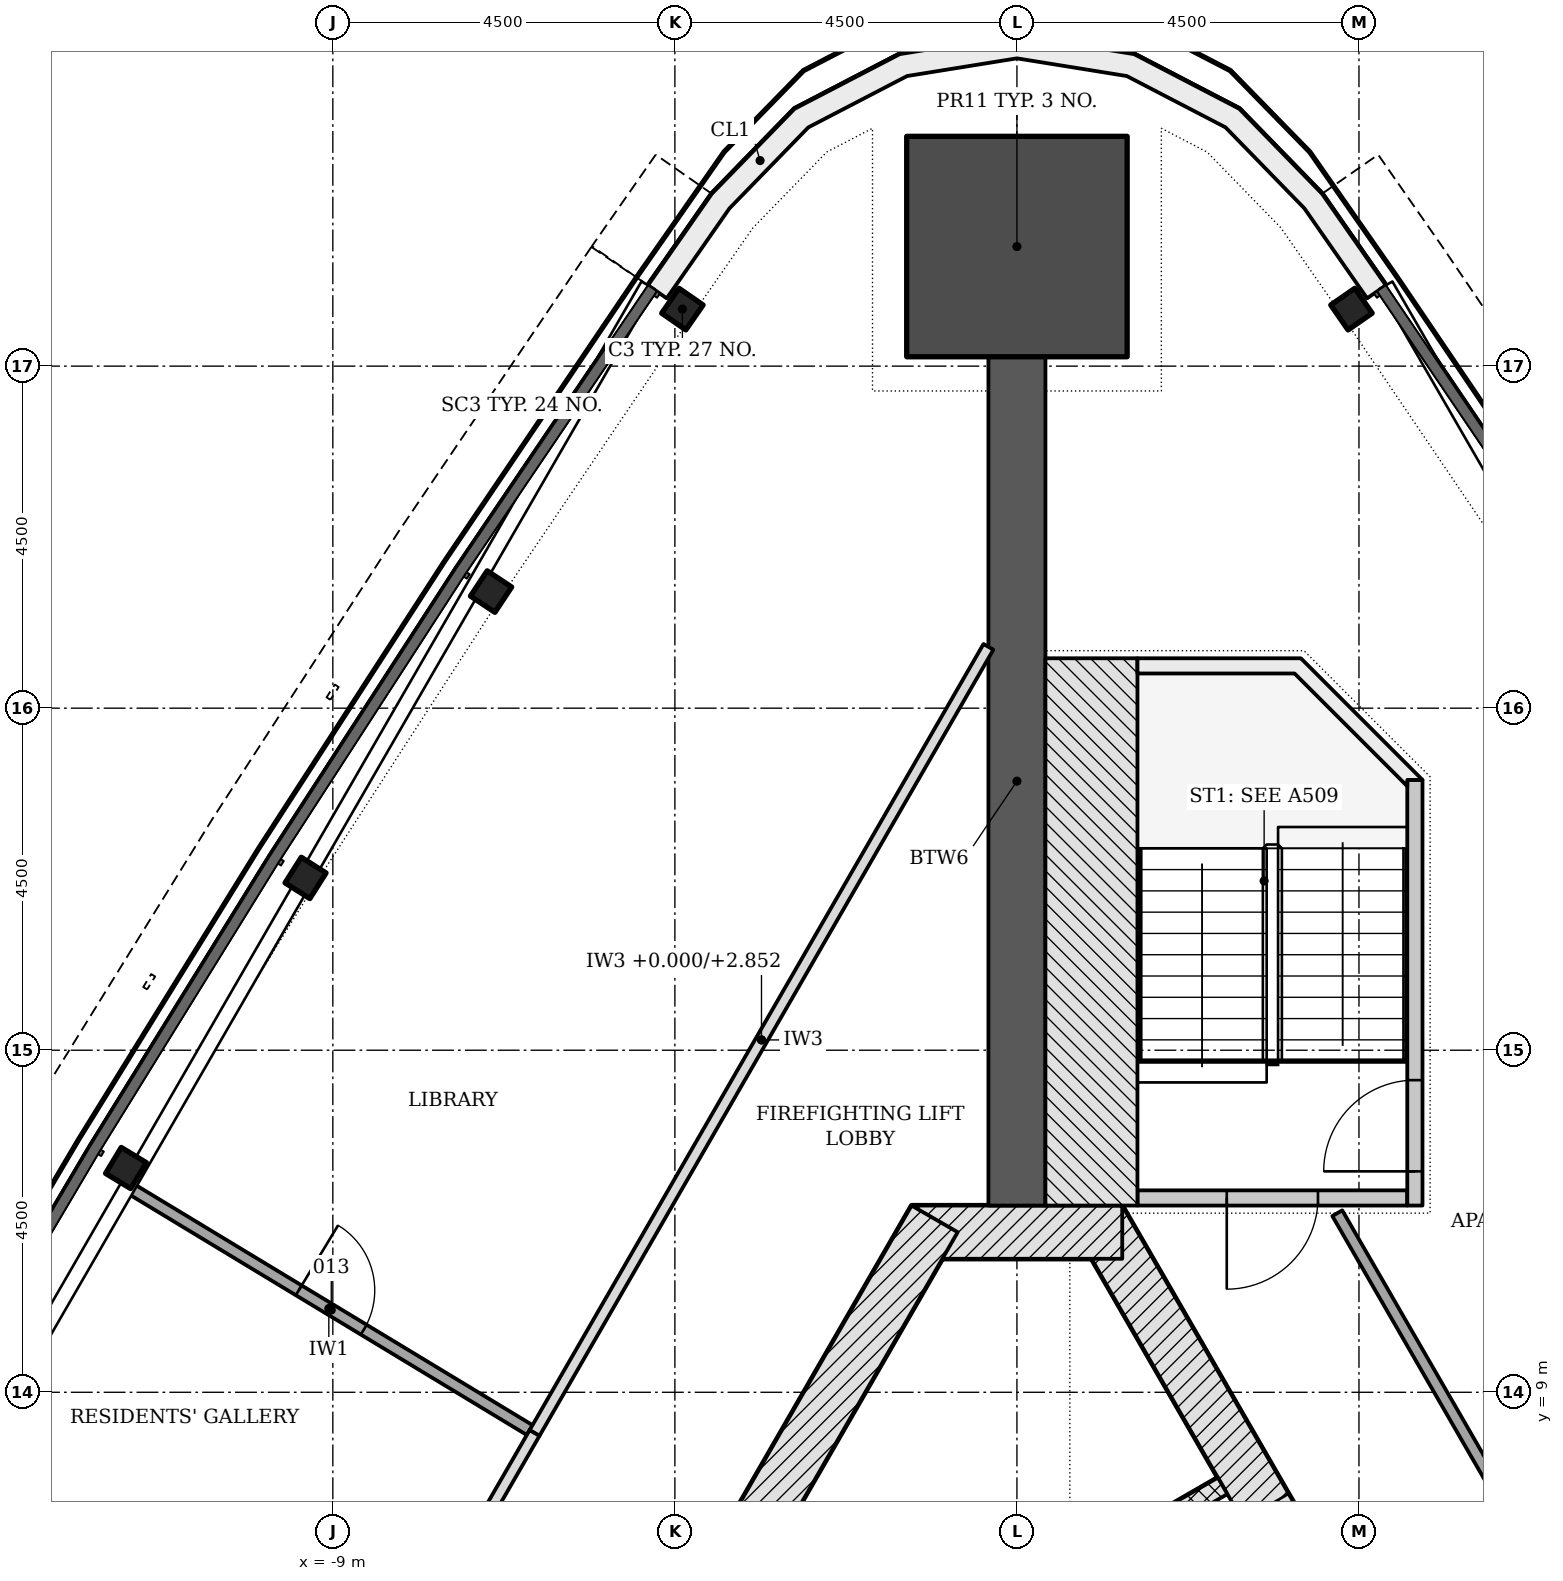
"""IFC4 building model, lengths in metres.
Left out: names, types, materials, properties, quantities, classifications, styles, units other than length and angle.
Written with IfcOpenShell. Run it as: python <this file> out.ifc"""

import sys

from ifc_helpers import new_model, si_unit, direction, frame, frame_2d, origin, origin_2d, place, context, subcontext, project, spatial, polyline, rectangle, i_section, outline, extrude, element, fill, save


model = new_model("IFC4")
c1 = context("Model", 3, precision=1e-05, world=origin(), true_north=direction((0.0, 1.0)))
c2 = subcontext(c1, "Body", "Model", "MODEL_VIEW")
j1 = project(units=[si_unit("LENGTHUNIT", "METRE"), si_unit("PLANEANGLEUNIT", "RADIAN")], contexts=[c1])
p1 = place(None, origin())
s1 = spatial("IfcSite", under=j1, at=p1, CompositionType="ELEMENT")
p2 = place(p1, origin())
s2 = spatial("IfcBuilding", under=s1, at=p2, CompositionType="ELEMENT")
p3 = place(p2, frame((0.0, 0.0, 140.1)))
s3 = spatial("IfcBuildingStorey", under=s2, at=p3, CompositionType="ELEMENT", Elevation=140.1)
p4 = place(p3, frame((10.311, -4.703, -0.2), z_axis=(0.0, 0.0, 1.0), x_axis=(-0.500001446645, 0.866024568562, 0.0)))
e1 = element("IfcWall", 1, at=p4, inside=s3, PredefinedType="SHEAR", context=c2, shape_type="SweptSolid", body=[
    extrude(rectangle(XDim=18.458, YDim=0.7, at=frame_2d((9.229, 0.0))), origin(), (0.0, 0.0, 1.0), 3.6),
])
p5 = place(p4, frame((4.379, 0.0, 0.2)))
e2 = element("IfcOpeningElement", 2, at=p5, cuts=e1, PredefinedType="OPENING", context=c2, shape_type="SweptSolid", body=[
    extrude(rectangle(XDim=1.1, YDim=2.1, at=frame_2d((0.55, 1.05))), frame((0.0, 0.36, 0.0), z_axis=(0.0, -1.0, 0.0), x_axis=(1.0, 0.0, 0.0)), (0.0, 0.0, 1.0), 0.72),
])
p6 = place(p4, frame((6.529, 0.0, 0.2)))
e3 = element("IfcOpeningElement", 3, at=p6, cuts=e1, PredefinedType="OPENING", context=c2, shape_type="SweptSolid", body=[
    extrude(rectangle(XDim=1.1, YDim=2.1, at=frame_2d((0.55, 1.05))), frame((0.0, 0.36, 0.0), z_axis=(0.0, -1.0, 0.0), x_axis=(1.0, 0.0, 0.0)), (0.0, 0.0, 1.0), 0.72),
])
p7 = place(p4, frame((8.679, 0.0, 0.2)))
e4 = element("IfcOpeningElement", 4, at=p7, cuts=e1, PredefinedType="OPENING", context=c2, shape_type="SweptSolid", body=[
    extrude(rectangle(XDim=1.1, YDim=2.1, at=frame_2d((0.55, 1.05))), frame((0.0, 0.36, 0.0), z_axis=(0.0, -1.0, 0.0), x_axis=(1.0, 0.0, 0.0)), (0.0, 0.0, 1.0), 0.72),
])
p8 = place(p4, frame((10.829, 0.0, 0.2)))
e5 = element("IfcOpeningElement", 5, at=p8, cuts=e1, PredefinedType="OPENING", context=c2, shape_type="SweptSolid", body=[
    extrude(rectangle(XDim=1.1, YDim=2.1, at=frame_2d((0.55, 1.05))), frame((0.0, 0.36, 0.0), z_axis=(0.0, -1.0, 0.0), x_axis=(1.0, 0.0, 0.0)), (0.0, 0.0, 1.0), 0.72),
])
p9 = place(p4, frame((12.979, 0.0, 0.2)))
e6 = element("IfcOpeningElement", 6, at=p9, cuts=e1, PredefinedType="OPENING", context=c2, shape_type="SweptSolid", body=[
    extrude(rectangle(XDim=1.1, YDim=2.1, at=frame_2d((0.55, 1.05))), frame((0.0, 0.36, 0.0), z_axis=(0.0, -1.0, 0.0), x_axis=(1.0, 0.0, 0.0)), (0.0, 0.0, 1.0), 0.72),
])
p10 = place(p3, frame((1.386, 11.106, -0.2), z_axis=(0.0, 0.0, 1.0), x_axis=(-1.0, 0.0, 0.0)))
e7 = element("IfcWall", 7, at=p10, inside=s3, PredefinedType="SHEAR", context=c2, shape_type="SweptSolid", body=[
    extrude(rectangle(XDim=2.771, YDim=0.7, at=frame_2d((1.386, 0.0))), origin(), (0.0, 0.0, 1.0), 3.6),
])
p11 = place(p3, frame((-1.083, 11.281, -0.2), z_axis=(0.0, 0.0, 1.0), x_axis=(-0.500001446645, -0.866024568562, 0.0)))
e8 = element("IfcWall", 8, at=p11, inside=s3, PredefinedType="SHEAR", context=c2, shape_type="SweptSolid", body=[
    extrude(rectangle(XDim=18.458, YDim=0.7, at=frame_2d((9.229, 0.0))), origin(), (0.0, 0.0, 1.0), 3.6),
])
p12 = place(p11, frame((8.979, 0.0, 0.2)))
e9 = element("IfcOpeningElement", 9, at=p12, cuts=e8, PredefinedType="OPENING", context=c2, shape_type="SweptSolid", body=[
    extrude(rectangle(XDim=1.2, YDim=2.1, at=frame_2d((0.6, 1.05))), frame((0.0, 0.36, 0.0), z_axis=(0.0, -1.0, 0.0), x_axis=(1.0, 0.0, 0.0)), (0.0, 0.0, 1.0), 0.72),
])
p13 = place(p11, frame((11.029, 0.0, 0.2)))
e10 = element("IfcOpeningElement", 10, at=p13, cuts=e8, PredefinedType="OPENING", context=c2, shape_type="SweptSolid", body=[
    extrude(rectangle(XDim=1.2, YDim=2.1, at=frame_2d((0.6, 1.05))), frame((0.0, 0.36, 0.0), z_axis=(0.0, -1.0, 0.0), x_axis=(1.0, 0.0, 0.0)), (0.0, 0.0, 1.0), 0.72),
])
p14 = place(p3, frame((0.0, 11.456, -0.2), z_axis=(0.0, 0.0, 1.0), x_axis=(0.0, 1.0, 0.0)))
e11 = element("IfcWall", 11, at=p14, inside=s3, PredefinedType="SHEAR", context=c2, shape_type="SweptSolid", body=[
    extrude(rectangle(XDim=11.167, YDim=0.75, at=frame_2d((5.583, 0.0))), origin(), (0.0, 0.0, 1.0), 3.6),
])
p15 = place(p3, frame((0.0, 24.073, -0.2), z_axis=(0.0, 0.0, 1.0), x_axis=(0.0, 1.0, 0.0)))
e12 = element("IfcColumn", 12, at=p15, inside=s3, PredefinedType="COLUMN", context=c2, shape_type="SweptSolid", body=[
    extrude(rectangle(XDim=2.9, YDim=2.9, at=origin_2d()), origin(), (0.0, 0.0, 1.0), 3.6),
])
for number, where, z_axis, x_axis in (
    (13, (-4.401, 23.25, -0.2), (0.0, 0.0, 1.0), (-0.569, -0.822, 0.0)),
    (14, (-6.918, 19.534, -0.2), (0.0, 0.0, 1.0), (-0.552, -0.834, 0.0)),
    (15, (-9.359, 15.767, -0.2), (0.0, 0.0, 1.0), (-0.535, -0.845, 0.0)),
    (16, (-11.722, 11.95, -0.2), (0.0, 0.0, 1.0), (-0.518, -0.856, 0.0)),
    (17, (4.401, 23.25, -0.2), (0.0, 0.0, 1.0), (-0.569, 0.822, 0.0)),
):
    element("IfcColumn", number, at=place(p3, frame(where, z_axis=z_axis, x_axis=x_axis)), inside=s3, PredefinedType="COLUMN", context=c2, shape_type="SweptSolid", body=[
        extrude(i_section(OverallWidth=0.399, OverallDepth=0.386, WebThickness=0.021, FlangeThickness=0.033, FilletRadius=0.015, at=origin_2d()), origin(), (0.0, 0.0, 1.0), 3.6),
    ])
p16 = place(p3, origin())
e18 = element("IfcWall", 18, at=p16, inside=s3, PredefinedType="NOTDEFINED", context=c2, shape_type="SweptSolid", body=[
    extrude(outline(polyline([(4.853, 23.563), (4.014, 24.767), (2.925, 25.885), (1.541, 26.605), (0.0, 26.853), (-1.541, 26.605), (-2.925, 25.885), (-4.014, 24.767), (-4.853, 23.563), (-4.607, 23.392), (-3.782, 24.575), (-2.744, 25.641), (-1.445, 26.316), (0.0, 26.549), (1.445, 26.316), (2.744, 25.641), (3.782, 24.575), (4.607, 23.392), (4.853, 23.563)])), origin(), (0.0, 0.0, 1.0), 3.3),
])
p17 = place(p3, frame((2.706, 7.769, -0.2), z_axis=(0.0, 0.0, 1.0), x_axis=(-0.866022959057, -0.500004234368, 0.0)))
e19 = element("IfcWall", 19, at=p17, inside=s3, PredefinedType="PARTITIONING", context=c2, shape_type="SweptSolid", body=[
    extrude(rectangle(XDim=2.5, YDim=0.25, at=frame_2d((1.25, 0.0))), origin(), (0.0, 0.0, 1.0), 3.6),
])
p18 = place(p3, frame((5.135, 11.556, -0.2), z_axis=(0.0, 0.0, 1.0), x_axis=(-1.0, 0.0, 0.0)))
e20 = element("IfcWall", 20, at=p18, inside=s3, PredefinedType="SHEAR", context=c2, shape_type="SweptSolid", body=[
    extrude(rectangle(XDim=3.55, YDim=0.2, at=frame_2d((1.775, 0.0))), origin(), (0.0, 0.0, 1.0), 3.6),
])
p19 = place(p18, frame((1.175, 0.0, 0.2)))
e21 = element("IfcOpeningElement", 21, at=p19, cuts=e20, PredefinedType="OPENING", context=c2, shape_type="SweptSolid", body=[
    extrude(rectangle(XDim=1.2, YDim=2.1, at=frame_2d((0.6, 1.05))), frame((0.0, 0.11, 0.0), z_axis=(0.0, -1.0, 0.0), x_axis=(1.0, 0.0, 0.0)), (0.0, 0.0, 1.0), 0.22),
])
p20 = place(p3, frame((5.236, 11.456, -0.2), z_axis=(0.0, 0.0, 1.0), x_axis=(0.0, 1.0, 0.0)))
e22 = element("IfcWall", 22, at=p20, inside=s3, PredefinedType="SHEAR", context=c2, shape_type="SweptSolid", body=[
    extrude(rectangle(XDim=5.6, YDim=0.2, at=frame_2d((2.8, 0.0))), origin(), (0.0, 0.0, 1.0), 3.6),
])
p21 = place(p20, frame((0.45, 0.0, 0.2)))
e23 = element("IfcOpeningElement", 23, at=p21, cuts=e22, PredefinedType="OPENING", context=c2, shape_type="SweptSolid", body=[
    extrude(rectangle(XDim=1.2, YDim=2.1, at=frame_2d((0.6, 1.05))), frame((0.0, 0.11, 0.0), z_axis=(0.0, -1.0, 0.0), x_axis=(1.0, 0.0, 0.0)), (0.0, 0.0, 1.0), 0.22),
])
p22 = place(p3, frame((0.98, 11.456, -0.2), z_axis=(0.0, 0.0, 1.0), x_axis=(0.0, 1.0, 0.0)))
e24 = element("IfcWall", 24, at=p22, inside=s3, PredefinedType="SHEAR", context=c2, shape_type="SweptSolid", body=[
    extrude(rectangle(XDim=7.2, YDim=1.211, at=frame_2d((3.6, 0.0))), origin(), (0.0, 0.0, 1.0), 3.6),
])
p23 = place(p3, frame((0.0, 0.0, -0.2)))
e25 = element("IfcWall", 25, at=p23, inside=s3, PredefinedType="SHEAR", context=c2, shape_type="SweptSolid", body=[
    extrude(outline(polyline([(5.336, 17.056), (3.736, 18.656), (1.586, 18.656), (1.586, 18.456), (3.653, 18.456), (5.135, 16.974), (5.135, 17.056), (5.135, 17.056), (5.135, 17.056), (5.135, 17.056), (5.135, 17.056), (5.135, 17.056), (5.135, 17.056), (5.135, 17.056), (5.135, 17.056), (5.135, 17.056), (5.135, 17.056), (5.135, 17.056), (5.135, 17.056), (5.135, 17.056), (5.135, 17.056), (5.135, 17.056), (5.135, 17.056), (5.336, 17.056)])), origin(), (0.0, 0.0, 1.0), 3.6),
])
p24 = place(p3, frame((7.979, 4.837, 0.0), z_axis=(0.0, 0.0, 1.0), x_axis=(-0.500014427086, 0.866017074142, 0.0)))
e26 = element("IfcWall", 26, at=p24, inside=s3, PredefinedType="PARTITIONING", context=c2, shape_type="SweptSolid", body=[
    extrude(rectangle(XDim=7.528, YDim=0.15, at=frame_2d((3.764, 0.0))), origin(), (0.0, 0.0, 1.0), 2.847),
])
p25 = place(p3, frame((-0.375, 18.807, 0.0), z_axis=(0.0, 0.0, 1.0), x_axis=(-0.499995562011, -0.866027966043, 0.0)))
e27 = element("IfcWall", 27, at=p25, inside=s3, PredefinedType="PARTITIONING", context=c2, shape_type="SweptSolid", body=[
    extrude(rectangle(XDim=11.942, YDim=0.15, at=frame_2d((5.971, 0.0))), origin(), (0.0, 0.0, 1.0), 2.852),
])
p26 = place(p3, frame((-11.695, 11.7, 0.0), z_axis=(0.0, 0.0, 1.0), x_axis=(0.855596827578, -0.517642800238, 0.0)))
e28 = element("IfcWall", 28, at=p26, inside=s3, PredefinedType="PARTITIONING", context=c2, shape_type="SweptSolid", body=[
    extrude(rectangle(XDim=6.177, YDim=0.15, at=frame_2d((3.088, 0.0))), origin(), (0.0, 0.0, 1.0), 3.4),
])
p27 = place(p26, frame((2.626, 0.0, 0.0)))
e29 = element("IfcOpeningElement", 29, at=p27, cuts=e28, PredefinedType="OPENING", context=c2, shape_type="SweptSolid", body=[
    extrude(rectangle(XDim=1.0, YDim=2.1, at=frame_2d((0.5, 1.05))), frame((0.0, 0.085, 0.0), z_axis=(0.0, -1.0, 0.0), x_axis=(1.0, 0.0, 0.0)), (0.0, 0.0, 1.0), 0.17),
])
p28 = place(p3, frame((-13.974, 7.837, 0.0), z_axis=(0.0, 0.0, 1.0), x_axis=(0.866040415161, -0.499973998632, 0.0)))
e30 = element("IfcWall", 30, at=p28, inside=s3, PredefinedType="PARTITIONING", context=c2, shape_type="SweptSolid", body=[
    extrude(rectangle(XDim=6.217, YDim=0.15, at=frame_2d((3.108, 0.0))), origin(), (0.0, 0.0, 1.0), 3.4),
])
p29 = place(p28, frame((2.646, 0.0, 0.0)))
e31 = element("IfcOpeningElement", 31, at=p29, cuts=e30, PredefinedType="OPENING", context=c2, shape_type="SweptSolid", body=[
    extrude(rectangle(XDim=1.0, YDim=2.1, at=frame_2d((0.5, 1.05))), frame((0.0, 0.085, 0.0), z_axis=(0.0, -1.0, 0.0), x_axis=(1.0, 0.0, 0.0)), (0.0, 0.0, 1.0), 0.17),
])
p30 = place(p3, frame((-6.346, 8.464, 0.0), z_axis=(0.0, 0.0, 1.0), x_axis=(-0.50001992892, -0.866013897511, 0.0)))
e32 = element("IfcWall", 32, at=p30, inside=s3, PredefinedType="PARTITIONING", context=c2, shape_type="SweptSolid", body=[
    extrude(rectangle(XDim=4.357, YDim=0.15, at=frame_2d((2.179, 0.0))), origin(), (0.0, 0.0, 1.0), 2.847),
])
p31 = place(p30, frame((1.678, 0.0, 0.0)))
e33 = element("IfcOpeningElement", 33, at=p31, cuts=e32, PredefinedType="OPENING", context=c2, shape_type="SweptSolid", body=[
    extrude(rectangle(XDim=1.0, YDim=2.1, at=frame_2d((0.5, 1.05))), frame((0.0, 0.085, 0.0), z_axis=(0.0, -1.0, 0.0), x_axis=(1.0, 0.0, 0.0)), (0.0, 0.0, 1.0), 0.17),
])
p32 = place(p19, origin())
e34 = element("IfcDoor", 34, at=p32, inside=s3, OperationType="SINGLE_SWING_RIGHT", PredefinedType="DOOR", context=c2, shape_type="SweptSolid", body=[
    extrude(rectangle(XDim=1.2, YDim=2.1, at=frame_2d((0.6, 1.05))), frame((0.0, 0.025, 0.0), z_axis=(0.0, -1.0, 0.0), x_axis=(1.0, 0.0, 0.0)), (0.0, 0.0, 1.0), 0.05),
])
fill(e21, e34)
p33 = place(p21, origin())
e35 = element("IfcDoor", 35, at=p33, inside=s3, OperationType="SINGLE_SWING_LEFT", PredefinedType="DOOR", context=c2, shape_type="SweptSolid", body=[
    extrude(rectangle(XDim=1.2, YDim=2.1, at=frame_2d((0.6, 1.05))), frame((0.0, 0.025, 0.0), z_axis=(0.0, -1.0, 0.0), x_axis=(1.0, 0.0, 0.0)), (0.0, 0.0, 1.0), 0.05),
])
fill(e23, e35)
p34 = place(p27, origin())
e36 = element("IfcDoor", 36, at=p34, inside=s3, OperationType="SINGLE_SWING_LEFT", PredefinedType="DOOR", context=c2, shape_type="SweptSolid", body=[
    extrude(rectangle(XDim=1.0, YDim=2.1, at=frame_2d((0.5, 1.05))), frame((0.0, 0.025, 0.0), z_axis=(0.0, -1.0, 0.0), x_axis=(1.0, 0.0, 0.0)), (0.0, 0.0, 1.0), 0.05),
])
fill(e29, e36)
save(model, sys.argv[1])
